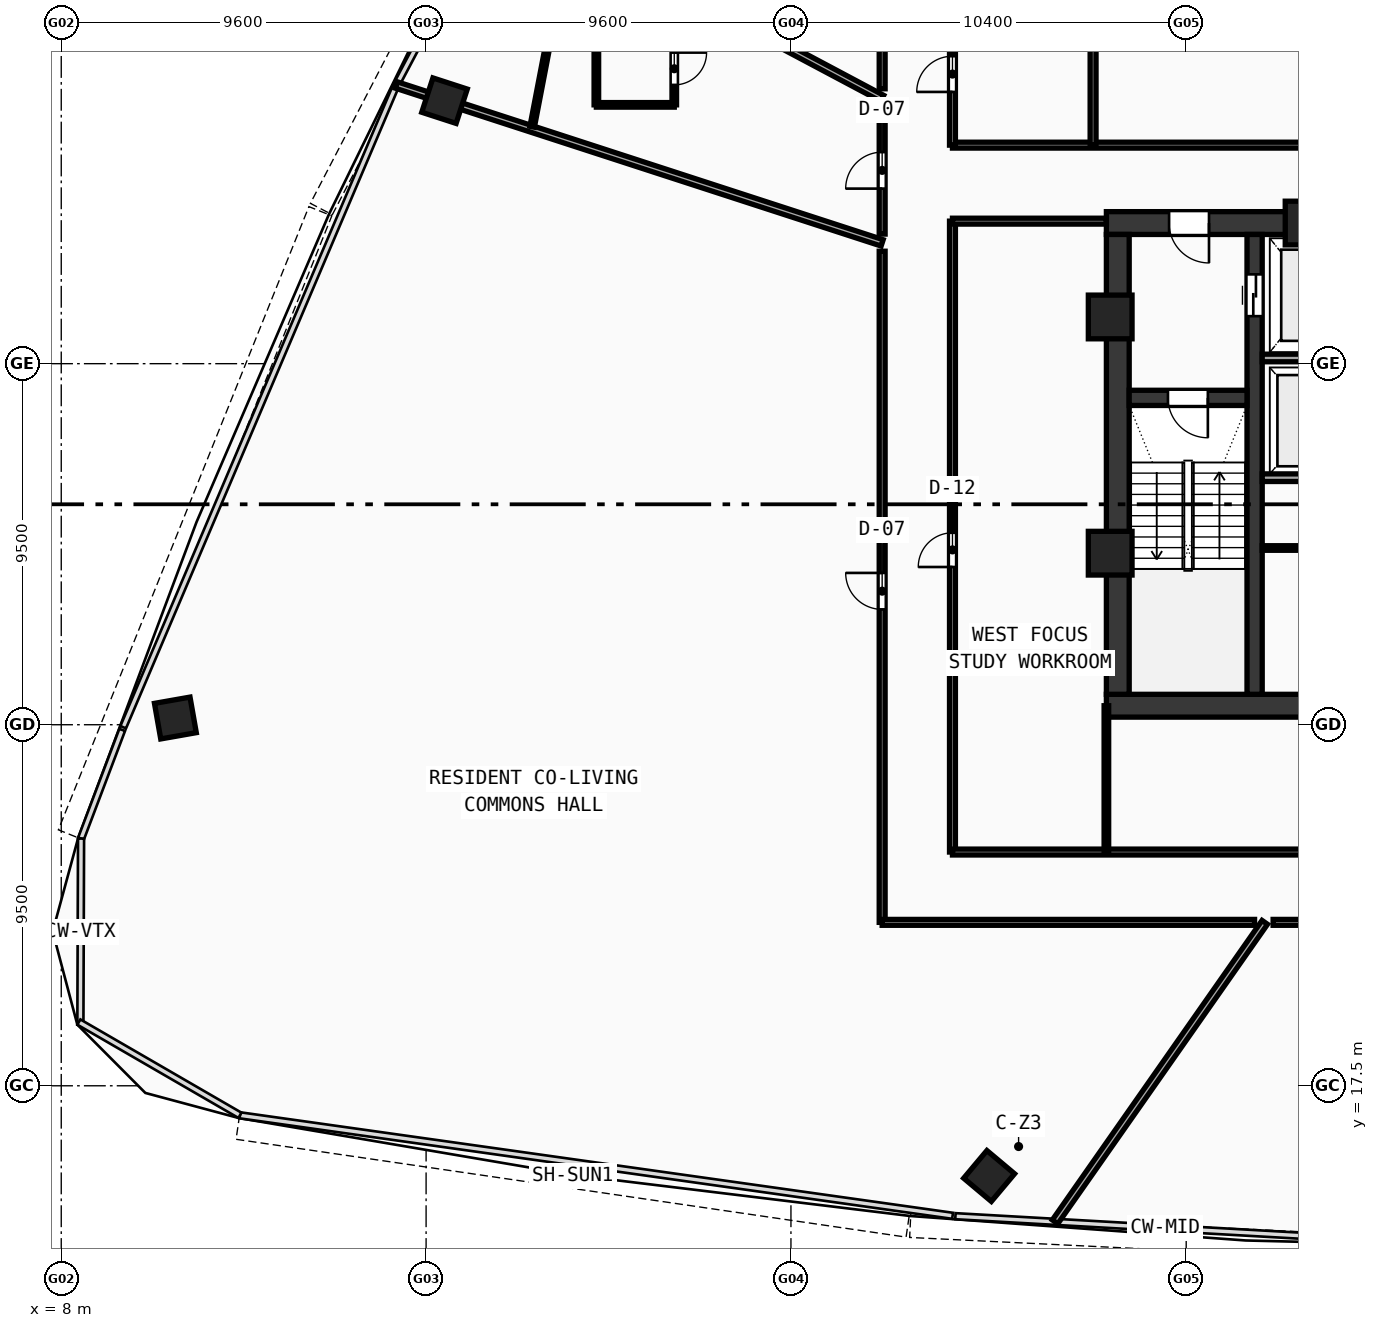
"""IFC4 building model, lengths in metres.
Left out: names, types, materials, properties, quantities, classifications, styles, units other than length and angle.
Written with IfcOpenShell. Run it as: python <this file> out.ifc"""

import sys

from ifc_helpers import new_model, si_unit, direction, frame, frame_2d, origin, origin_with_axes, origin_2d, place, context, subcontext, project, spatial, rectangle, hollow_rectangle, extrude, source, transform, mapped, element, fill, save


model = new_model("IFC4")
c1 = context("Model", 3, precision=1e-05, world=origin(), true_north=direction((0.0, 1.0)))
c2 = subcontext(c1, "Body", "Model", "MODEL_VIEW")
j1 = project(units=[si_unit("LENGTHUNIT", "METRE"), si_unit("PLANEANGLEUNIT", "RADIAN")], contexts=[c1])
p1 = place(None, origin())
s1 = spatial("IfcSite", under=j1, at=p1, CompositionType="ELEMENT")
p2 = place(p1, origin())
s2 = spatial("IfcBuilding", under=s1, at=p2, CompositionType="ELEMENT")
p3 = place(p2, frame((0.0, 0.0, 155.59)))
s3 = spatial("IfcBuildingStorey", under=s2, at=p3, CompositionType="ELEMENT", Elevation=155.59)
p4 = place(p3, frame((35.5, 27.5, 0.0), z_axis=(0.0, 0.0, 1.0), x_axis=(1.0, 0.0, 0.0)))
e1 = element("IfcWall", 1, at=p4, inside=s3, PredefinedType="SHEAR", context=c2, shape_type="SweptSolid", body=[
    extrude(rectangle(XDim=25.0, YDim=0.6, at=frame_2d((12.5, 0.0))), origin(), (0.0, 0.0, 1.0), 3.42),
])
p5 = place(p3, frame((35.5, 40.2, 0.0), z_axis=(0.0, 0.0, 1.0), x_axis=(1.0, 0.0, 0.0)))
e2 = element("IfcWall", 2, at=p5, inside=s3, PredefinedType="SHEAR", context=c2, shape_type="SweptSolid", body=[
    extrude(rectangle(XDim=11.3, YDim=0.6, at=frame_2d((5.65, 0.0))), origin(), (0.0, 0.0, 1.0), 3.42),
])
p6 = place(p5, frame((1.65, 0.0, 0.0)))
e3 = element("IfcOpeningElement", 3, at=p6, cuts=e2, PredefinedType="OPENING", context=c2, shape_type="SweptSolid", body=[
    extrude(rectangle(XDim=1.05, YDim=2.1, at=frame_2d((0.525, 1.05))), frame((0.0, 0.31, 0.0), z_axis=(0.0, -1.0, 0.0), x_axis=(1.0, 0.0, 0.0)), (0.0, 0.0, 1.0), 0.62),
])
p7 = place(p3, frame((35.8, 27.8, 0.0), z_axis=(0.0, 0.0, 1.0), x_axis=(0.0, 1.0, 0.0)))
e4 = element("IfcWall", 4, at=p7, inside=s3, PredefinedType="SHEAR", context=c2, shape_type="SweptSolid", body=[
    extrude(rectangle(XDim=12.1, YDim=0.6, at=frame_2d((6.05, 0.0))), origin(), (0.0, 0.0, 1.0), 3.42),
])
p8 = place(p3, frame((39.4, 27.8, 0.0), z_axis=(0.0, 0.0, 1.0), x_axis=(0.0, 1.0, 0.0)))
e5 = element("IfcWall", 5, at=p8, inside=s3, PredefinedType="SHEAR", context=c2, shape_type="SweptSolid", body=[
    extrude(rectangle(XDim=12.1, YDim=0.4, at=frame_2d((6.05, 0.0))), origin(), (0.0, 0.0, 1.0), 3.42),
])
p9 = place(p8, frame((9.95, 0.0, 0.0)))
e6 = element("IfcOpeningElement", 6, at=p9, cuts=e5, PredefinedType="OPENING", context=c2, shape_type="SweptSolid", body=[
    extrude(rectangle(XDim=1.1, YDim=2.1, at=frame_2d((0.55, 1.05))), frame((0.0, 0.21, 0.0), z_axis=(0.0, -1.0, 0.0), x_axis=(1.0, 0.0, 0.0)), (0.0, 0.0, 1.0), 0.42),
])
p10 = place(p3, frame((36.1, 35.6, 0.0), z_axis=(0.0, 0.0, 1.0), x_axis=(1.0, 0.0, 0.0)))
e7 = element("IfcWall", 7, at=p10, inside=s3, PredefinedType="SHEAR", context=c2, shape_type="SweptSolid", body=[
    extrude(rectangle(XDim=3.1, YDim=0.4, at=frame_2d((1.55, 0.0))), origin(), (0.0, 0.0, 1.0), 3.42),
])
p11 = place(p10, frame((1.02, 0.0, 0.0)))
e8 = element("IfcOpeningElement", 8, at=p11, cuts=e7, PredefinedType="OPENING", context=c2, shape_type="SweptSolid", body=[
    extrude(rectangle(XDim=1.05, YDim=2.1, at=frame_2d((0.525, 1.05))), frame((0.0, 0.21, 0.0), z_axis=(0.0, -1.0, 0.0), x_axis=(1.0, 0.0, 0.0)), (0.0, 0.0, 1.0), 0.42),
])
m1 = source(origin(), c2, "Body", "SweptSolid", [
    extrude(hollow_rectangle(XDim=1.15, YDim=1.15, WallThickness=0.048, at=origin_2d()), origin(), (0.0, 0.0, 1.0), 3.68),
])
for number, where, z_axis, x_axis in (
    (9, (40.781, 40.2, -0.26), (0.0, 0.0, 1.0), (1.0, 0.0, 0.0)),
    (10, (35.6, 37.729, -0.26), (0.0, 0.0, 1.0), (1.0, 0.0, 0.0)),
    (11, (35.6, 31.513, -0.26), (0.0, 0.0, 1.0), (1.0, 0.0, 0.0)),
):
    element("IfcColumn", number, at=place(p3, frame(where, z_axis=z_axis, x_axis=x_axis)), inside=s3, PredefinedType="COLUMN", context=c2, shape_type="MappedRepresentation", body=[
        mapped(m1, transform((0.0, 0.0, 0.0), scale=1.0)),
    ])
m2 = source(origin(), c2, "Body", "SweptSolid", [
    extrude(hollow_rectangle(XDim=0.95, YDim=0.95, WallThickness=0.04, at=origin_2d()), origin(), (0.0, 0.0, 1.0), 3.68),
])
for number, where, z_axis, x_axis in (
    (12, (32.415, 15.126, -0.26), (0.0, 0.0, 1.0), (0.766, -0.643, 0.0)),
    (13, (18.085, 43.42, -0.26), (0.0, 0.0, 1.0), (-0.309, -0.951, 0.0)),
    (14, (11.003, 27.177, -0.26), (0.0, 0.0, 1.0), (0.174, -0.985, 0.0)),
):
    element("IfcColumn", number, at=place(p3, frame(where, z_axis=z_axis, x_axis=x_axis)), inside=s3, PredefinedType="COLUMN", context=c2, shape_type="MappedRepresentation", body=[
        mapped(m2, transform((0.0, 0.0, 0.0), scale=1.0)),
    ])
for number, where, z_axis, x_axis in (
    (15, (39.6, 36.65, 0.0), (0.0, 0.0, 1.0), (1.0, 0.0, 0.0)),
    (16, (39.6, 33.5, 0.0), (0.0, 0.0, 1.0), (1.0, 0.0, 0.0)),
):
    element("IfcWall", number, at=place(p3, frame(where, z_axis=z_axis, x_axis=x_axis)), inside=s3, PredefinedType="SOLIDWALL", context=c2, shape_type="SweptSolid", body=[
        extrude(rectangle(XDim=2.72, YDim=0.2, at=frame_2d((1.36, 0.0))), origin(), (0.0, 0.0, 1.0), 3.42),
    ])
p12 = place(p3, frame((39.6, 31.65, 0.0), z_axis=(0.0, 0.0, 1.0), x_axis=(1.0, 0.0, 0.0)))
e17 = element("IfcWall", 17, at=p12, inside=s3, PredefinedType="PARTITIONING", context=c2, shape_type="SweptSolid", body=[
    extrude(rectangle(XDim=2.72, YDim=0.12, at=frame_2d((1.36, 0.0))), origin(), (0.0, 0.0, 1.0), 3.42),
])
p13 = place(p3, frame((31.45, 42.25, 0.0), z_axis=(0.0, 0.0, 1.0), x_axis=(1.0, 0.0, 0.0)))
e18 = element("IfcWall", 18, at=p13, inside=s3, PredefinedType="PARTITIONING", context=c2, shape_type="SweptSolid", body=[
    extrude(rectangle(XDim=33.1, YDim=0.155, at=frame_2d((16.55, 0.0))), origin(), (0.0, 0.0, 1.0), 2.77),
])
p14 = place(p3, frame((31.45, 42.25, 0.0), z_axis=(0.0, 0.0, 1.0), x_axis=(0.0, 1.0, 0.0)))
e19 = element("IfcWall", 19, at=p14, inside=s3, PredefinedType="PARTITIONING", context=c2, shape_type="SweptSolid", body=[
    extrude(rectangle(XDim=11.7, YDim=0.155, at=frame_2d((5.85, 0.0))), origin(), (0.0, 0.0, 1.0), 2.77),
])
p15 = place(p14, frame((1.4, 0.0, 0.0)))
e20 = element("IfcOpeningElement", 20, at=p15, cuts=e19, PredefinedType="OPENING", context=c2, shape_type="SweptSolid", body=[
    extrude(rectangle(XDim=0.94, YDim=2.1, at=frame_2d((0.47, 1.05))), frame((0.0, 0.087, 0.0), z_axis=(0.0, -1.0, 0.0), x_axis=(1.0, 0.0, 0.0)), (0.0, 0.0, 1.0), 0.175),
])
p16 = place(p14, frame((6.8, 0.0, 0.0)))
e21 = element("IfcOpeningElement", 21, at=p16, cuts=e19, PredefinedType="OPENING", context=c2, shape_type="SweptSolid", body=[
    extrude(rectangle(XDim=0.92, YDim=2.1, at=frame_2d((0.46, 1.05))), frame((0.0, 0.087, 0.0), z_axis=(0.0, -1.0, 0.0), x_axis=(1.0, 0.0, 0.0)), (0.0, 0.0, 1.0), 0.175),
])
p17 = place(p3, frame((35.15, 42.25, 0.0), z_axis=(0.0, 0.0, 1.0), x_axis=(0.0, 1.0, 0.0)))
e22 = element("IfcWall", 22, at=p17, inside=s3, PredefinedType="PARTITIONING", context=c2, shape_type="SweptSolid", body=[
    extrude(rectangle(XDim=11.7, YDim=0.155, at=frame_2d((5.85, 0.0))), origin(), (0.0, 0.0, 1.0), 2.77),
])
p18 = place(p3, frame((31.45, 23.65, 0.0), z_axis=(0.0, 0.0, 1.0), x_axis=(0.0, 1.0, 0.0)))
e23 = element("IfcWall", 23, at=p18, inside=s3, PredefinedType="PARTITIONING", context=c2, shape_type="SweptSolid", body=[
    extrude(rectangle(XDim=16.6, YDim=0.155, at=frame_2d((8.3, 0.0))), origin(), (0.0, 0.0, 1.0), 2.77),
])
p19 = place(p18, frame((7.5, 0.0, 0.0)))
e24 = element("IfcOpeningElement", 24, at=p19, cuts=e23, PredefinedType="OPENING", context=c2, shape_type="SweptSolid", body=[
    extrude(rectangle(XDim=0.9, YDim=2.08, at=frame_2d((0.45, 1.04))), frame((0.0, 0.087, 0.0), z_axis=(0.0, -1.0, 0.0), x_axis=(1.0, 0.0, 0.0)), (0.0, 0.0, 1.0), 0.175),
])
p20 = place(p3, frame((31.45, 23.65, 0.0), z_axis=(0.0, 0.0, 1.0), x_axis=(1.0, 0.0, 0.0)))
e25 = element("IfcWall", 25, at=p20, inside=s3, PredefinedType="PARTITIONING", context=c2, shape_type="SweptSolid", body=[
    extrude(rectangle(XDim=33.1, YDim=0.155, at=frame_2d((16.55, 0.0))), origin(), (0.0, 0.0, 1.0), 2.77),
])
p21 = place(p20, frame((16.0, 0.0, 0.0)))
e26 = element("IfcOpeningElement", 26, at=p21, cuts=e25, PredefinedType="OPENING", context=c2, shape_type="SweptSolid", body=[
    extrude(rectangle(XDim=0.92, YDim=2.1, at=frame_2d((0.46, 1.05))), frame((0.0, 0.087, 0.0), z_axis=(0.0, -1.0, 0.0), x_axis=(1.0, 0.0, 0.0)), (0.0, 0.0, 1.0), 0.175),
])
p22 = place(p3, frame((31.45, 40.25, 0.0), z_axis=(0.0, 0.0, 1.0), x_axis=(1.0, 0.0, 0.0)))
e27 = element("IfcWall", 27, at=p22, inside=s3, PredefinedType="PARTITIONING", context=c2, shape_type="SweptSolid", body=[
    extrude(rectangle(XDim=4.05, YDim=0.155, at=frame_2d((2.025, 0.0))), origin(), (0.0, 0.0, 1.0), 3.42),
])
p23 = place(p3, frame((35.5, 23.65, 0.0), z_axis=(0.0, 0.0, 1.0), x_axis=(0.0, 1.0, 0.0)))
e28 = element("IfcWall", 28, at=p23, inside=s3, PredefinedType="PARTITIONING", context=c2, shape_type="SweptSolid", body=[
    extrude(rectangle(XDim=3.85, YDim=0.12, at=frame_2d((1.925, 0.0))), origin(), (0.0, 0.0, 1.0), 3.02),
])
p24 = place(p3, frame((29.6, 43.483, 0.0), z_axis=(0.0, 0.0, 1.0), x_axis=(-0.882944706502, 0.469476991193, 0.0)))
e29 = element("IfcWall", 29, at=p24, inside=s3, PredefinedType="PARTITIONING", context=c2, shape_type="SweptSolid", body=[
    extrude(rectangle(XDim=11.464, YDim=0.175, at=frame_2d((5.732, 0.0))), origin(), (0.0, 0.0, 1.0), 2.77),
])
p25 = place(p3, frame((29.6, 39.678, 0.0), z_axis=(0.0, 0.0, 1.0), x_axis=(-0.951059027278, 0.309009266259, 0.0)))
e30 = element("IfcWall", 30, at=p25, inside=s3, PredefinedType="PARTITIONING", context=c2, shape_type="SweptSolid", body=[
    extrude(rectangle(XDim=13.441, YDim=0.175, at=frame_2d((6.72, 0.0))), origin(), (0.0, 0.0, 1.0), 2.77),
])
p26 = place(p3, frame((39.667, 21.8, 0.0), z_axis=(0.0, 0.0, 1.0), x_axis=(-0.573578164834, -0.81915083399, 0.0)))
e31 = element("IfcWall", 31, at=p26, inside=s3, PredefinedType="PARTITIONING", context=c2, shape_type="SweptSolid", body=[
    extrude(rectangle(XDim=9.62, YDim=0.175, at=frame_2d((4.81, 0.0))), origin(), (0.0, 0.0, 1.0), 2.77),
])
p27 = place(p3, frame((29.6, 21.8, 0.0), z_axis=(0.0, 0.0, 1.0), x_axis=(0.0, 1.0, 0.0)))
e32 = element("IfcWall", 32, at=p27, inside=s3, PredefinedType="PARTITIONING", context=c2, shape_type="SweptSolid", body=[
    extrude(rectangle(XDim=17.659, YDim=0.155, at=frame_2d((8.829, 0.0))), origin(), (0.0, 0.0, 1.0), 2.77),
])
p28 = place(p27, frame((8.234, 0.0, 0.0)))
e33 = element("IfcOpeningElement", 33, at=p28, cuts=e32, PredefinedType="OPENING", context=c2, shape_type="SweptSolid", body=[
    extrude(rectangle(XDim=0.96, YDim=2.12, at=frame_2d((0.48, 1.06))), frame((0.0, 0.087, 0.0), z_axis=(0.0, -1.0, 0.0), x_axis=(1.0, 0.0, 0.0)), (0.0, 0.0, 1.0), 0.175),
])
p29 = place(p3, frame((29.6, 39.91, 0.0), z_axis=(0.0, 0.0, 1.0), x_axis=(0.0, 1.0, 0.0)))
e34 = element("IfcWall", 34, at=p29, inside=s3, PredefinedType="PARTITIONING", context=c2, shape_type="SweptSolid", body=[
    extrude(rectangle(XDim=3.354, YDim=0.155, at=frame_2d((1.677, 0.0))), origin(), (0.0, 0.0, 1.0), 3.02),
])
p30 = place(p29, frame((1.196, 0.0, 0.0)))
e35 = element("IfcOpeningElement", 35, at=p30, cuts=e34, PredefinedType="OPENING", context=c2, shape_type="SweptSolid", body=[
    extrude(rectangle(XDim=0.96, YDim=2.12, at=frame_2d((0.48, 1.06))), frame((0.0, 0.087, 0.0), z_axis=(0.0, -1.0, 0.0), x_axis=(1.0, 0.0, 0.0)), (0.0, 0.0, 1.0), 0.175),
])
p31 = place(p3, frame((29.6, 43.733, 0.0), z_axis=(0.0, 0.0, 1.0), x_axis=(0.0, 1.0, 0.0)))
e36 = element("IfcWall", 36, at=p31, inside=s3, PredefinedType="PARTITIONING", context=c2, shape_type="SweptSolid", body=[
    extrude(rectangle(XDim=6.315, YDim=0.155, at=frame_2d((3.157, 0.0))), origin(), (0.0, 0.0, 1.0), 2.77),
])
p32 = place(p31, frame((2.683, 0.0, 0.0)))
e37 = element("IfcOpeningElement", 37, at=p32, cuts=e36, PredefinedType="OPENING", context=c2, shape_type="SweptSolid", body=[
    extrude(rectangle(XDim=0.92, YDim=2.1, at=frame_2d((0.46, 1.05))), frame((0.0, 0.087, 0.0), z_axis=(0.0, -1.0, 0.0), x_axis=(1.0, 0.0, 0.0)), (0.0, 0.0, 1.0), 0.175),
])
p33 = place(p3, frame((44.583, 21.8, 0.0), z_axis=(0.0, 0.0, 1.0), x_axis=(-1.0, 0.0, 0.0)))
e38 = element("IfcWall", 38, at=p33, inside=s3, PredefinedType="PARTITIONING", context=c2, shape_type="SweptSolid", body=[
    extrude(rectangle(XDim=4.696, YDim=0.155, at=frame_2d((2.348, 0.0))), origin(), (0.0, 0.0, 1.0), 3.42),
])
p34 = place(p33, frame((1.869, 0.0, 0.0)))
e39 = element("IfcOpeningElement", 39, at=p34, cuts=e38, PredefinedType="OPENING", context=c2, shape_type="SweptSolid", body=[
    extrude(rectangle(XDim=0.96, YDim=2.12, at=frame_2d((0.48, 1.06))), frame((0.0, 0.087, 0.0), z_axis=(0.0, -1.0, 0.0), x_axis=(1.0, 0.0, 0.0)), (0.0, 0.0, 1.0), 0.175),
])
p35 = place(p3, frame((39.399, 21.8, 0.0), z_axis=(0.0, 0.0, 1.0), x_axis=(-1.0, 0.0, 0.0)))
e40 = element("IfcWall", 40, at=p35, inside=s3, PredefinedType="PARTITIONING", context=c2, shape_type="SweptSolid", body=[
    extrude(rectangle(XDim=9.799, YDim=0.155, at=frame_2d((4.899, 0.0))), origin(), (0.0, 0.0, 1.0), 2.77),
])
p36 = place(p3, frame((22.08, 43.31, 0.0), z_axis=(0.0, 0.0, 1.0), x_axis=(1.0, 0.0, 0.0)))
e41 = element("IfcWall", 41, at=p36, inside=s3, PredefinedType="PARTITIONING", context=c2, shape_type="SweptSolid", body=[
    extrude(rectangle(XDim=2.05, YDim=0.12, at=frame_2d((1.025, 0.0))), origin(), (0.0, 0.0, 1.0), 3.42),
])
p37 = place(p3, frame((24.13, 43.31, 0.0), z_axis=(0.0, 0.0, 1.0), x_axis=(0.0, 1.0, 0.0)))
e42 = element("IfcWall", 42, at=p37, inside=s3, PredefinedType="PARTITIONING", context=c2, shape_type="SweptSolid", body=[
    extrude(rectangle(XDim=1.9, YDim=0.12, at=frame_2d((0.95, 0.0))), origin(), (0.0, 0.0, 1.0), 3.42),
])
p38 = place(p37, frame((0.525, 0.0, 0.0)))
e43 = element("IfcOpeningElement", 43, at=p38, cuts=e42, PredefinedType="OPENING", context=c2, shape_type="SweptSolid", body=[
    extrude(rectangle(XDim=0.85, YDim=2.1, at=frame_2d((0.425, 1.05))), frame((0.0, 0.07, 0.0), z_axis=(0.0, -1.0, 0.0), x_axis=(1.0, 0.0, 0.0)), (0.0, 0.0, 1.0), 0.14),
])
p39 = place(p3, frame((22.08, 45.21, 0.0), z_axis=(0.0, 0.0, 1.0), x_axis=(0.0, -1.0, 0.0)))
e44 = element("IfcWall", 44, at=p39, inside=s3, PredefinedType="PARTITIONING", context=c2, shape_type="SweptSolid", body=[
    extrude(rectangle(XDim=1.9, YDim=0.12, at=frame_2d((0.95, 0.0))), origin(), (0.0, 0.0, 1.0), 3.42),
])
p40 = place(p3, frame((21.364, 47.795, 0.0), z_axis=(0.0, 0.0, 1.0), x_axis=(-0.188731428073, -0.982028740953, 0.0)))
e45 = element("IfcWall", 45, at=p40, inside=s3, PredefinedType="PARTITIONING", context=c2, shape_type="SweptSolid", body=[
    extrude(rectangle(XDim=5.154, YDim=0.12, at=frame_2d((2.577, 0.0))), origin(), (0.0, 0.0, 1.0), 2.77),
])
p41 = place(p40, frame((2.117, 0.0, 0.0)))
e46 = element("IfcOpeningElement", 46, at=p41, cuts=e45, PredefinedType="OPENING", context=c2, shape_type="SweptSolid", body=[
    extrude(rectangle(XDim=0.92, YDim=2.1, at=frame_2d((0.46, 1.05))), frame((0.0, 0.07, 0.0), z_axis=(0.0, -1.0, 0.0), x_axis=(1.0, 0.0, 0.0)), (0.0, 0.0, 1.0), 0.14),
])
m3 = source(origin(), c2, "Body", "SweptSolid", [
    extrude(rectangle(XDim=1.05, YDim=2.1, at=frame_2d((0.525, 1.05))), frame((0.0, 0.025, 0.0), z_axis=(0.0, -1.0, 0.0), x_axis=(1.0, 0.0, 0.0)), (0.0, 0.0, 1.0), 0.05),
])
p42 = place(p11, frame((1.05, 0.0, 0.0), z_axis=(0.0, 0.0, 1.0), x_axis=(-1.0, 0.0, 0.0)))
e47 = element("IfcDoor", 47, at=p42, inside=s3, OperationType="SINGLE_SWING_LEFT", PredefinedType="DOOR", context=c2, shape_type="MappedRepresentation", body=[
    mapped(m3, transform((0.0, 0.0, 0.0), scale=1.0)),
])
fill(e8, e47)
p43 = place(p6, frame((1.05, 0.0, 0.0), z_axis=(0.0, 0.0, 1.0), x_axis=(-1.0, 0.0, 0.0)))
e48 = element("IfcDoor", 48, at=p43, inside=s3, OperationType="SINGLE_SWING_LEFT", PredefinedType="DOOR", context=c2, shape_type="MappedRepresentation", body=[
    mapped(m3, transform((0.0, 0.0, 0.0), scale=1.0)),
])
fill(e3, e48)
m4 = source(origin(), c2, "Body", "SweptSolid", [
    extrude(rectangle(XDim=1.1, YDim=2.1, at=frame_2d((0.55, 1.05))), frame((0.0, 0.025, 0.0), z_axis=(0.0, -1.0, 0.0), x_axis=(1.0, 0.0, 0.0)), (0.0, 0.0, 1.0), 0.05),
])
p44 = place(p9, frame((1.1, 0.0, 0.0), z_axis=(0.0, 0.0, 1.0), x_axis=(-1.0, 0.0, 0.0)))
e49 = element("IfcDoor", 49, at=p44, inside=s3, OperationType="DOUBLE_DOOR_SLIDING", PredefinedType="DOOR", context=c2, shape_type="MappedRepresentation", body=[
    mapped(m4, transform((0.0, 0.0, 0.0), scale=1.0)),
])
fill(e6, e49)
m5 = source(origin(), c2, "Body", "SweptSolid", [
    extrude(rectangle(XDim=0.94, YDim=2.1, at=frame_2d((0.47, 1.05))), frame((0.0, 0.025, 0.0), z_axis=(0.0, -1.0, 0.0), x_axis=(1.0, 0.0, 0.0)), (0.0, 0.0, 1.0), 0.05),
])
p45 = place(p15, origin_with_axes())
e50 = element("IfcDoor", 50, at=p45, inside=s3, OperationType="SINGLE_SWING_LEFT", PredefinedType="DOOR", context=c2, shape_type="MappedRepresentation", body=[
    mapped(m5, transform((0.0, 0.0, 0.0), scale=1.0)),
])
fill(e20, e50)
m6 = source(origin(), c2, "Body", "SweptSolid", [
    extrude(rectangle(XDim=0.9, YDim=2.08, at=frame_2d((0.45, 1.04))), frame((0.0, 0.025, 0.0), z_axis=(0.0, -1.0, 0.0), x_axis=(1.0, 0.0, 0.0)), (0.0, 0.0, 1.0), 0.05),
])
p46 = place(p19, origin_with_axes())
e51 = element("IfcDoor", 51, at=p46, inside=s3, OperationType="SINGLE_SWING_LEFT", PredefinedType="DOOR", context=c2, shape_type="MappedRepresentation", body=[
    mapped(m6, transform((0.0, 0.0, 0.0), scale=1.0)),
])
fill(e24, e51)
m7 = source(origin(), c2, "Body", "SweptSolid", [
    extrude(rectangle(XDim=0.96, YDim=2.12, at=frame_2d((0.48, 1.06))), frame((0.0, 0.025, 0.0), z_axis=(0.0, -1.0, 0.0), x_axis=(1.0, 0.0, 0.0)), (0.0, 0.0, 1.0), 0.05),
])
p47 = place(p30, origin_with_axes())
e52 = element("IfcDoor", 52, at=p47, inside=s3, OperationType="SINGLE_SWING_LEFT", PredefinedType="DOOR", context=c2, shape_type="MappedRepresentation", body=[
    mapped(m7, transform((0.0, 0.0, 0.0), scale=1.0)),
])
fill(e35, e52)
m8 = source(origin(), c2, "Body", "SweptSolid", [
    extrude(rectangle(XDim=0.85, YDim=2.1, at=frame_2d((0.425, 1.05))), frame((0.0, 0.025, 0.0), z_axis=(0.0, -1.0, 0.0), x_axis=(1.0, 0.0, 0.0)), (0.0, 0.0, 1.0), 0.05),
])
p48 = place(p38, frame((0.85, 0.0, 0.0), z_axis=(0.0, 0.0, 1.0), x_axis=(-1.0, 0.0, 0.0)))
e53 = element("IfcDoor", 53, at=p48, inside=s3, OperationType="SINGLE_SWING_LEFT", PredefinedType="DOOR", context=c2, shape_type="MappedRepresentation", body=[
    mapped(m8, transform((0.0, 0.0, 0.0), scale=1.0)),
])
fill(e43, e53)
p49 = place(p28, origin_with_axes())
e54 = element("IfcDoor", 54, at=p49, inside=s3, OperationType="SINGLE_SWING_RIGHT", PredefinedType="DOOR", context=c2, shape_type="MappedRepresentation", body=[
    mapped(m7, transform((0.0, 0.0, 0.0), scale=1.0)),
])
fill(e33, e54)
save(model, sys.argv[1])
